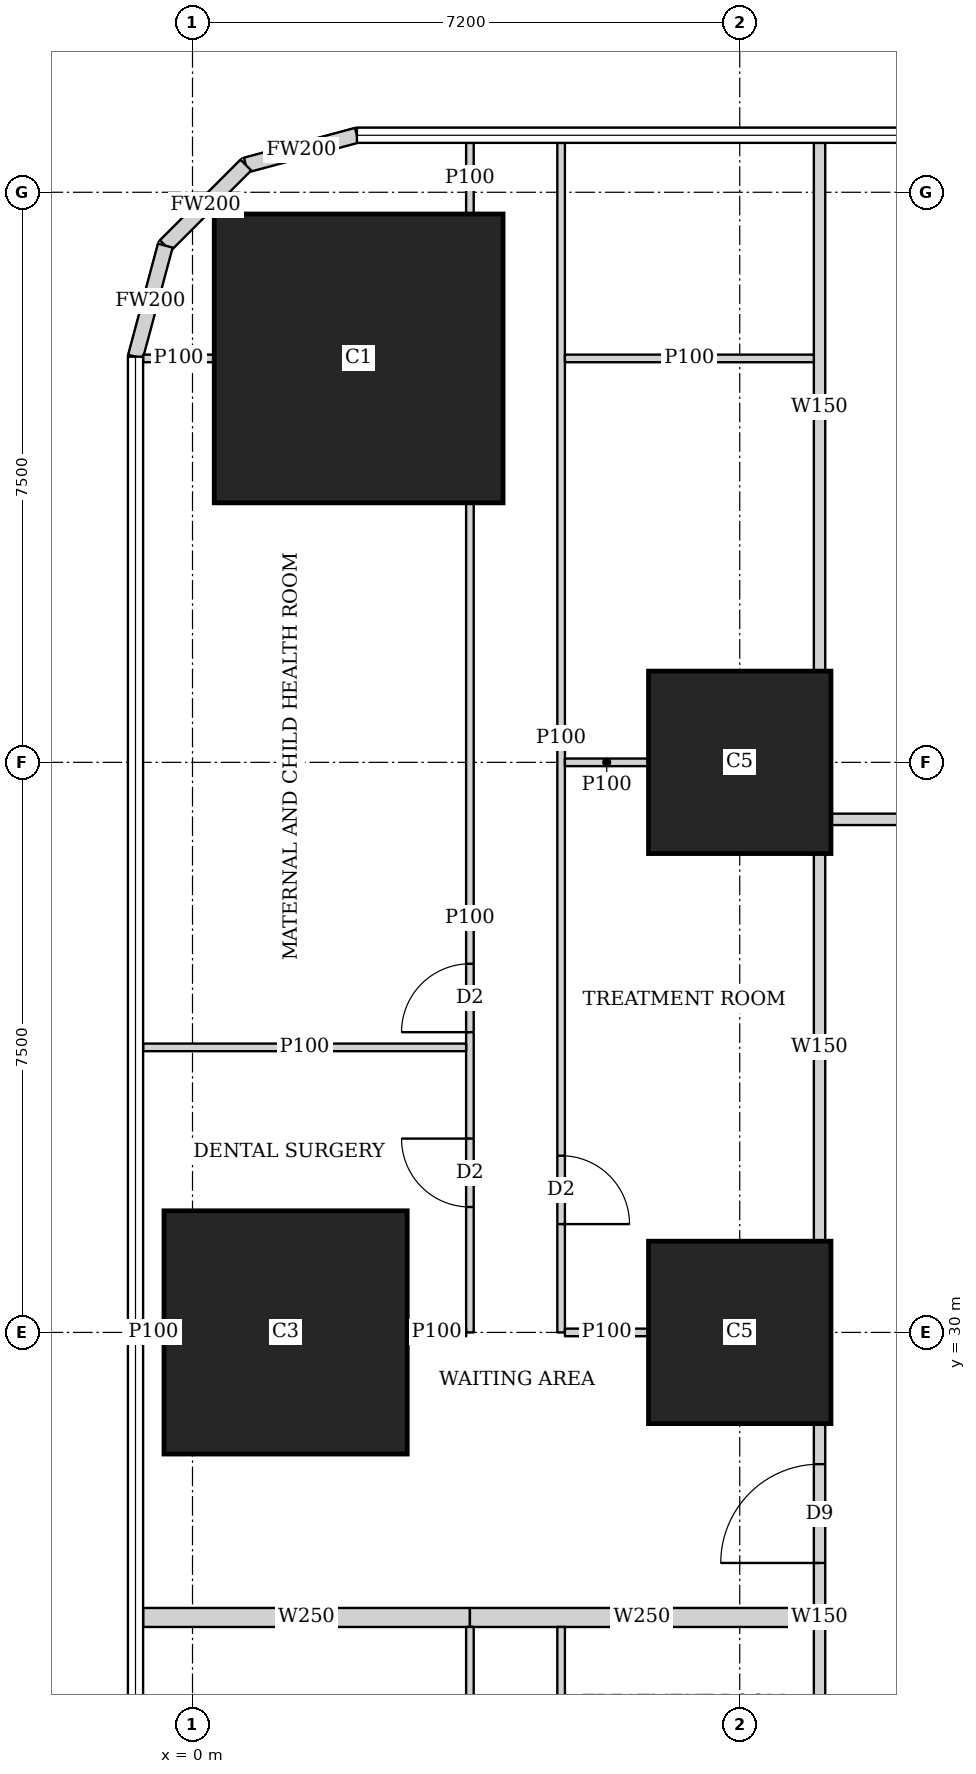
"""IFC4 building model, lengths in metres.
Left out: names, types, materials, properties, quantities, classifications, styles, units other than length and angle.
Written with IfcOpenShell. Run it as: python <this file> out.ifc"""

import sys

from ifc_helpers import new_model, si_unit, direction, frame, frame_2d, origin, origin_2d, place, context, subcontext, project, spatial, rectangle, extrude, element, fill, save


model = new_model("IFC4")
c1 = context("Model", 3, precision=1e-05, world=origin(), true_north=direction((0.0, 1.0)))
c2 = subcontext(c1, "Body", "Model", "MODEL_VIEW")
j1 = project(units=[si_unit("LENGTHUNIT", "METRE"), si_unit("PLANEANGLEUNIT", "RADIAN")], contexts=[c1])
p1 = place(None, origin())
s1 = spatial("IfcSite", under=j1, at=p1, CompositionType="ELEMENT")
p2 = place(p1, origin())
s2 = spatial("IfcBuilding", under=s1, at=p2, CompositionType="ELEMENT")
p3 = place(p2, frame((0.0, 0.0, 10.1)))
s3 = spatial("IfcBuildingStorey", under=s2, at=p3, CompositionType="ELEMENT", Elevation=10.1)
p4 = place(p3, frame((1.225, 30.0, 0.0), z_axis=(0.0, 0.0, 1.0), x_axis=(1.0, 0.0, 0.0)))
e1 = element("IfcColumn", 1, at=p4, inside=s3, PredefinedType="COLUMN", context=c2, shape_type="SweptSolid", body=[
    extrude(rectangle(XDim=3.2, YDim=3.2, at=origin_2d()), origin(), (0.0, 0.0, 1.0), 4.5),
])
for number, where, z_axis, x_axis in (
    (2, (7.2, 30.0, 0.0), (0.0, 0.0, 1.0), (1.0, 0.0, 0.0)),
    (3, (7.2, 37.5, 0.0), (0.0, 0.0, 1.0), (1.0, 0.0, 0.0)),
):
    element("IfcColumn", number, at=place(p3, frame(where, z_axis=z_axis, x_axis=x_axis)), inside=s3, PredefinedType="COLUMN", context=c2, shape_type="SweptSolid", body=[
        extrude(rectangle(XDim=2.4, YDim=2.4, at=origin_2d()), origin(), (0.0, 0.0, 1.0), 4.5),
    ])
p5 = place(p3, frame((2.186, 42.814, 0.0), z_axis=(0.0, 0.0, 1.0), x_axis=(1.0, 0.0, 0.0)))
e4 = element("IfcColumn", 4, at=p5, inside=s3, PredefinedType="COLUMN", context=c2, shape_type="SweptSolid", body=[
    extrude(rectangle(XDim=3.8, YDim=3.8, at=origin_2d()), origin(), (0.0, 0.0, 1.0), 4.5),
])
p6 = place(p3, frame((2.163, 45.75, 0.0), z_axis=(0.0, 0.0, 1.0), x_axis=(-0.965832000415, -0.259168954497, 0.0)))
e5 = element("IfcWall", 5, at=p6, inside=s3, PredefinedType="SOLIDWALL", context=c2, shape_type="SweptSolid", body=[
    extrude(rectangle(XDim=1.513, YDim=0.2, at=frame_2d((0.756, 0.0))), origin(), (0.0, 0.0, 1.0), 4.2),
])
p7 = place(p3, frame((0.702, 45.358, 0.0), z_axis=(0.0, 0.0, 1.0), x_axis=(-0.707106781187, -0.707106781187, 0.0)))
e6 = element("IfcWall", 6, at=p7, inside=s3, PredefinedType="SOLIDWALL", context=c2, shape_type="SweptSolid", body=[
    extrude(rectangle(XDim=1.499, YDim=0.2, at=frame_2d((0.75, 0.0))), origin(), (0.0, 0.0, 1.0), 4.2),
])
p8 = place(p3, frame((-0.358, 44.298, 0.0), z_axis=(0.0, 0.0, 1.0), x_axis=(-0.259168954497, -0.965832000415, 0.0)))
e7 = element("IfcWall", 7, at=p8, inside=s3, PredefinedType="SOLIDWALL", context=c2, shape_type="SweptSolid", body=[
    extrude(rectangle(XDim=1.513, YDim=0.2, at=frame_2d((0.756, 0.0))), origin(), (0.0, 0.0, 1.0), 4.2),
])
p9 = place(p3, frame((8.25, 23.701, 0.0), z_axis=(0.0, 0.0, 1.0), x_axis=(0.0, 1.0, 0.0)))
e8 = element("IfcWall", 8, at=p9, inside=s3, PredefinedType="SOLIDWALL", context=c2, shape_type="SweptSolid", body=[
    extrude(rectangle(XDim=5.098, YDim=0.15, at=frame_2d((2.549, 0.0))), origin(), (0.0, 0.0, 1.0), 4.2),
])
p10 = place(p9, frame((3.266, 0.0, 0.0)))
e9 = element("IfcOpeningElement", 9, at=p10, cuts=e8, PredefinedType="OPENING", context=c2, shape_type="SweptSolid", body=[
    extrude(rectangle(XDim=1.3, YDim=2.1, at=frame_2d((0.65, 1.05))), frame((0.0, 0.085, 0.0), z_axis=(0.0, -1.0, 0.0), x_axis=(1.0, 0.0, 0.0)), (0.0, 0.0, 1.0), 0.17),
])
p11 = place(p3, frame((8.25, 31.201, 0.0), z_axis=(0.0, 0.0, 1.0), x_axis=(0.0, 1.0, 0.0)))
e10 = element("IfcWall", 10, at=p11, inside=s3, PredefinedType="SOLIDWALL", context=c2, shape_type="SweptSolid", body=[
    extrude(rectangle(XDim=5.098, YDim=0.15, at=frame_2d((2.549, 0.0))), origin(), (0.0, 0.0, 1.0), 4.2),
])
p12 = place(p3, frame((8.25, 38.701, 0.0), z_axis=(0.0, 0.0, 1.0), x_axis=(0.0, 1.0, 0.0)))
e11 = element("IfcWall", 11, at=p12, inside=s3, PredefinedType="SOLIDWALL", context=c2, shape_type="SweptSolid", body=[
    extrude(rectangle(XDim=6.949, YDim=0.15, at=frame_2d((3.475, 0.0))), origin(), (0.0, 0.0, 1.0), 2.4),
])
p13 = place(p3, frame((8.401, 36.75, 0.0), z_axis=(0.0, 0.0, 1.0), x_axis=(1.0, 0.0, 0.0)))
e12 = element("IfcWall", 12, at=p13, inside=s3, PredefinedType="SOLIDWALL", context=c2, shape_type="SweptSolid", body=[
    extrude(rectangle(XDim=4.798, YDim=0.15, at=frame_2d((2.399, 0.0))), origin(), (0.0, 0.0, 1.0), 2.6),
])
p14 = place(p13, frame((2.274, 0.0, 0.0)))
e13 = element("IfcOpeningElement", 13, at=p14, cuts=e12, PredefinedType="OPENING", context=c2, shape_type="SweptSolid", body=[
    extrude(rectangle(XDim=1.3, YDim=2.1, at=frame_2d((0.65, 1.05))), frame((0.0, 0.085, 0.0), z_axis=(0.0, -1.0, 0.0), x_axis=(1.0, 0.0, 0.0)), (0.0, 0.0, 1.0), 0.17),
])
p15 = place(p3, frame((3.65, 15.0, 0.0), z_axis=(0.0, 0.0, 1.0), x_axis=(0.0, 1.0, 0.0)))
e14 = element("IfcWall", 14, at=p15, inside=s3, PredefinedType="PARTITIONING", context=c2, shape_type="SweptSolid", body=[
    extrude(rectangle(XDim=11.125, YDim=0.1, at=frame_2d((5.562, 0.0))), origin(), (0.0, 0.0, 1.0), 2.6),
])
p16 = place(p15, frame((1.65, 0.0, 0.0)))
e15 = element("IfcOpeningElement", 15, at=p16, cuts=e14, PredefinedType="OPENING", context=c2, shape_type="SweptSolid", body=[
    extrude(rectangle(XDim=0.9, YDim=2.1, at=frame_2d((0.45, 1.05))), frame((0.0, 0.06, 0.0), z_axis=(0.0, -1.0, 0.0), x_axis=(1.0, 0.0, 0.0)), (0.0, 0.0, 1.0), 0.12),
])
p17 = place(p15, frame((3.95, 0.0, 0.0)))
e16 = element("IfcOpeningElement", 16, at=p17, cuts=e14, PredefinedType="OPENING", context=c2, shape_type="SweptSolid", body=[
    extrude(rectangle(XDim=0.9, YDim=2.1, at=frame_2d((0.45, 1.05))), frame((0.0, 0.06, 0.0), z_axis=(0.0, -1.0, 0.0), x_axis=(1.0, 0.0, 0.0)), (0.0, 0.0, 1.0), 0.12),
])
p18 = place(p3, frame((4.85, 15.0, 0.0), z_axis=(0.0, 0.0, 1.0), x_axis=(0.0, 1.0, 0.0)))
e17 = element("IfcWall", 17, at=p18, inside=s3, PredefinedType="PARTITIONING", context=c2, shape_type="SweptSolid", body=[
    extrude(rectangle(XDim=11.125, YDim=0.1, at=frame_2d((5.562, 0.0))), origin(), (0.0, 0.0, 1.0), 2.6),
])
p19 = place(p18, frame((1.425, 0.0, 0.0)))
e18 = element("IfcOpeningElement", 18, at=p19, cuts=e17, PredefinedType="OPENING", context=c2, shape_type="SweptSolid", body=[
    extrude(rectangle(XDim=0.9, YDim=2.1, at=frame_2d((0.45, 1.05))), frame((0.0, 0.06, 0.0), z_axis=(0.0, -1.0, 0.0), x_axis=(1.0, 0.0, 0.0)), (0.0, 0.0, 1.0), 0.12),
])
p20 = place(p18, frame((5.175, 0.0, 0.0)))
e19 = element("IfcOpeningElement", 19, at=p20, cuts=e17, PredefinedType="OPENING", context=c2, shape_type="SweptSolid", body=[
    extrude(rectangle(XDim=0.9, YDim=2.1, at=frame_2d((0.45, 1.05))), frame((0.0, 0.06, 0.0), z_axis=(0.0, -1.0, 0.0), x_axis=(1.0, 0.0, 0.0)), (0.0, 0.0, 1.0), 0.12),
])
p21 = place(p18, frame((8.925, 0.0, 0.0)))
e20 = element("IfcOpeningElement", 20, at=p21, cuts=e17, PredefinedType="OPENING", context=c2, shape_type="SweptSolid", body=[
    extrude(rectangle(XDim=0.9, YDim=2.1, at=frame_2d((0.45, 1.05))), frame((0.0, 0.06, 0.0), z_axis=(0.0, -1.0, 0.0), x_axis=(1.0, 0.0, 0.0)), (0.0, 0.0, 1.0), 0.12),
])
p22 = place(p3, frame((3.65, 30.0, 0.0), z_axis=(0.0, 0.0, 1.0), x_axis=(0.0, 1.0, 0.0)))
e21 = element("IfcWall", 21, at=p22, inside=s3, PredefinedType="PARTITIONING", context=c2, shape_type="SweptSolid", body=[
    extrude(rectangle(XDim=10.913, YDim=0.1, at=frame_2d((5.457, 0.0))), origin(), (0.0, 0.0, 1.0), 2.6),
])
p23 = place(p22, frame((1.65, 0.0, 0.0)))
e22 = element("IfcOpeningElement", 22, at=p23, cuts=e21, PredefinedType="OPENING", context=c2, shape_type="SweptSolid", body=[
    extrude(rectangle(XDim=0.9, YDim=2.1, at=frame_2d((0.45, 1.05))), frame((0.0, 0.06, 0.0), z_axis=(0.0, -1.0, 0.0), x_axis=(1.0, 0.0, 0.0)), (0.0, 0.0, 1.0), 0.12),
])
p24 = place(p22, frame((3.95, 0.0, 0.0)))
e23 = element("IfcOpeningElement", 23, at=p24, cuts=e21, PredefinedType="OPENING", context=c2, shape_type="SweptSolid", body=[
    extrude(rectangle(XDim=0.9, YDim=2.1, at=frame_2d((0.45, 1.05))), frame((0.0, 0.06, 0.0), z_axis=(0.0, -1.0, 0.0), x_axis=(1.0, 0.0, 0.0)), (0.0, 0.0, 1.0), 0.12),
])
p25 = place(p3, frame((3.65, 44.715, 0.0), z_axis=(0.0, 0.0, 1.0), x_axis=(0.0, 1.0, 0.0)))
e24 = element("IfcWall", 24, at=p25, inside=s3, PredefinedType="PARTITIONING", context=c2, shape_type="SweptSolid", body=[
    extrude(rectangle(XDim=0.935, YDim=0.1, at=frame_2d((0.467, 0.0))), origin(), (0.0, 0.0, 1.0), 4.2),
])
p26 = place(p3, frame((4.85, 30.0, 0.0), z_axis=(0.0, 0.0, 1.0), x_axis=(0.0, 1.0, 0.0)))
e25 = element("IfcWall", 25, at=p26, inside=s3, PredefinedType="PARTITIONING", context=c2, shape_type="SweptSolid", body=[
    extrude(rectangle(XDim=15.65, YDim=0.1, at=frame_2d((7.825, 0.0))), origin(), (0.0, 0.0, 1.0), 2.4),
])
p27 = place(p26, frame((1.425, 0.0, 0.0)))
e26 = element("IfcOpeningElement", 26, at=p27, cuts=e25, PredefinedType="OPENING", context=c2, shape_type="SweptSolid", body=[
    extrude(rectangle(XDim=0.9, YDim=2.1, at=frame_2d((0.45, 1.05))), frame((0.0, 0.06, 0.0), z_axis=(0.0, -1.0, 0.0), x_axis=(1.0, 0.0, 0.0)), (0.0, 0.0, 1.0), 0.12),
])
p28 = place(p3, frame((-0.65, 30.0, 0.0), z_axis=(0.0, 0.0, 1.0), x_axis=(1.0, 0.0, 0.0)))
e27 = element("IfcWall", 27, at=p28, inside=s3, PredefinedType="PARTITIONING", context=c2, shape_type="SweptSolid", body=[
    extrude(rectangle(XDim=0.274, YDim=0.1, at=frame_2d((0.137, 0.0))), origin(), (0.0, 0.0, 1.0), 4.2),
])
p29 = place(p3, frame((2.826, 30.0, 0.0), z_axis=(0.0, 0.0, 1.0), x_axis=(1.0, 0.0, 0.0)))
e28 = element("IfcWall", 28, at=p29, inside=s3, PredefinedType="PARTITIONING", context=c2, shape_type="SweptSolid", body=[
    extrude(rectangle(XDim=0.774, YDim=0.1, at=frame_2d((0.387, 0.0))), origin(), (0.0, 0.0, 1.0), 2.6),
])
p30 = place(p3, frame((-0.65, 33.75, 0.0), z_axis=(0.0, 0.0, 1.0), x_axis=(1.0, 0.0, 0.0)))
e29 = element("IfcWall", 29, at=p30, inside=s3, PredefinedType="PARTITIONING", context=c2, shape_type="SweptSolid", body=[
    extrude(rectangle(XDim=4.25, YDim=0.1, at=frame_2d((2.125, 0.0))), origin(), (0.0, 0.0, 1.0), 2.4),
])
p31 = place(p3, frame((-0.65, 42.814, 0.0), z_axis=(0.0, 0.0, 1.0), x_axis=(1.0, 0.0, 0.0)))
e30 = element("IfcWall", 30, at=p31, inside=s3, PredefinedType="PARTITIONING", context=c2, shape_type="SweptSolid", body=[
    extrude(rectangle(XDim=0.935, YDim=0.1, at=frame_2d((0.467, 0.0))), origin(), (0.0, 0.0, 1.0), 4.2),
])
p32 = place(p3, frame((4.9, 30.0, 0.0), z_axis=(0.0, 0.0, 1.0), x_axis=(1.0, 0.0, 0.0)))
e31 = element("IfcWall", 31, at=p32, inside=s3, PredefinedType="PARTITIONING", context=c2, shape_type="SweptSolid", body=[
    extrude(rectangle(XDim=1.099, YDim=0.1, at=frame_2d((0.55, 0.0))), origin(), (0.0, 0.0, 1.0), 2.6),
])
p33 = place(p3, frame((4.9, 37.5, 0.0), z_axis=(0.0, 0.0, 1.0), x_axis=(1.0, 0.0, 0.0)))
e32 = element("IfcWall", 32, at=p33, inside=s3, PredefinedType="PARTITIONING", context=c2, shape_type="SweptSolid", body=[
    extrude(rectangle(XDim=1.099, YDim=0.1, at=frame_2d((0.55, 0.0))), origin(), (0.0, 0.0, 1.0), 4.2),
])
p34 = place(p3, frame((4.9, 42.814, 0.0), z_axis=(0.0, 0.0, 1.0), x_axis=(1.0, 0.0, 0.0)))
e33 = element("IfcWall", 33, at=p34, inside=s3, PredefinedType="PARTITIONING", context=c2, shape_type="SweptSolid", body=[
    extrude(rectangle(XDim=3.275, YDim=0.1, at=frame_2d((1.638, 0.0))), origin(), (0.0, 0.0, 1.0), 2.4),
])
p35 = place(p3, frame((-0.65, 26.25, 0.0), z_axis=(0.0, 0.0, 1.0), x_axis=(1.0, 0.0, 0.0)))
e34 = element("IfcWall", 34, at=p35, inside=s3, PredefinedType="SOLIDWALL", context=c2, shape_type="SweptSolid", body=[
    extrude(rectangle(XDim=4.3, YDim=0.25, at=frame_2d((2.15, 0.0))), origin(), (0.0, 0.0, 1.0), 2.4),
])
p36 = place(p3, frame((3.65, 26.25, 0.0), z_axis=(0.0, 0.0, 1.0), x_axis=(1.0, 0.0, 0.0)))
e35 = element("IfcWall", 35, at=p36, inside=s3, PredefinedType="SOLIDWALL", context=c2, shape_type="SweptSolid", body=[
    extrude(rectangle(XDim=4.525, YDim=0.25, at=frame_2d((2.263, 0.0))), origin(), (0.0, 0.0, 1.0), 2.6),
])
p37 = place(p23, origin())
e36 = element("IfcDoor", 36, at=p37, inside=s3, OperationType="SINGLE_SWING_RIGHT", PredefinedType="DOOR", context=c2, shape_type="SweptSolid", body=[
    extrude(rectangle(XDim=0.9, YDim=2.1, at=frame_2d((0.45, 1.05))), frame((0.0, 0.025, 0.0), z_axis=(0.0, -1.0, 0.0), x_axis=(1.0, 0.0, 0.0)), (0.0, 0.0, 1.0), 0.05),
])
fill(e22, e36)
p38 = place(p24, origin())
e37 = element("IfcDoor", 37, at=p38, inside=s3, OperationType="SINGLE_SWING_LEFT", PredefinedType="DOOR", context=c2, shape_type="SweptSolid", body=[
    extrude(rectangle(XDim=0.9, YDim=2.1, at=frame_2d((0.45, 1.05))), frame((0.0, 0.025, 0.0), z_axis=(0.0, -1.0, 0.0), x_axis=(1.0, 0.0, 0.0)), (0.0, 0.0, 1.0), 0.05),
])
fill(e23, e37)
p39 = place(p27, origin())
e38 = element("IfcDoor", 38, at=p39, inside=s3, OperationType="SINGLE_SWING_RIGHT", PredefinedType="DOOR", context=c2, shape_type="SweptSolid", body=[
    extrude(rectangle(XDim=0.9, YDim=2.1, at=frame_2d((0.45, 1.05))), frame((0.0, 0.025, 0.0), z_axis=(0.0, -1.0, 0.0), x_axis=(1.0, 0.0, 0.0)), (0.0, 0.0, 1.0), 0.05),
])
fill(e26, e38)
p40 = place(p10, origin())
e39 = element("IfcDoor", 39, at=p40, inside=s3, OperationType="DOUBLE_DOOR_SINGLE_SWING", PredefinedType="DOOR", context=c2, shape_type="SweptSolid", body=[
    extrude(rectangle(XDim=1.3, YDim=2.1, at=frame_2d((0.65, 1.05))), frame((0.0, 0.025, 0.0), z_axis=(0.0, -1.0, 0.0), x_axis=(1.0, 0.0, 0.0)), (0.0, 0.0, 1.0), 0.05),
])
fill(e9, e39)
save(model, sys.argv[1])
